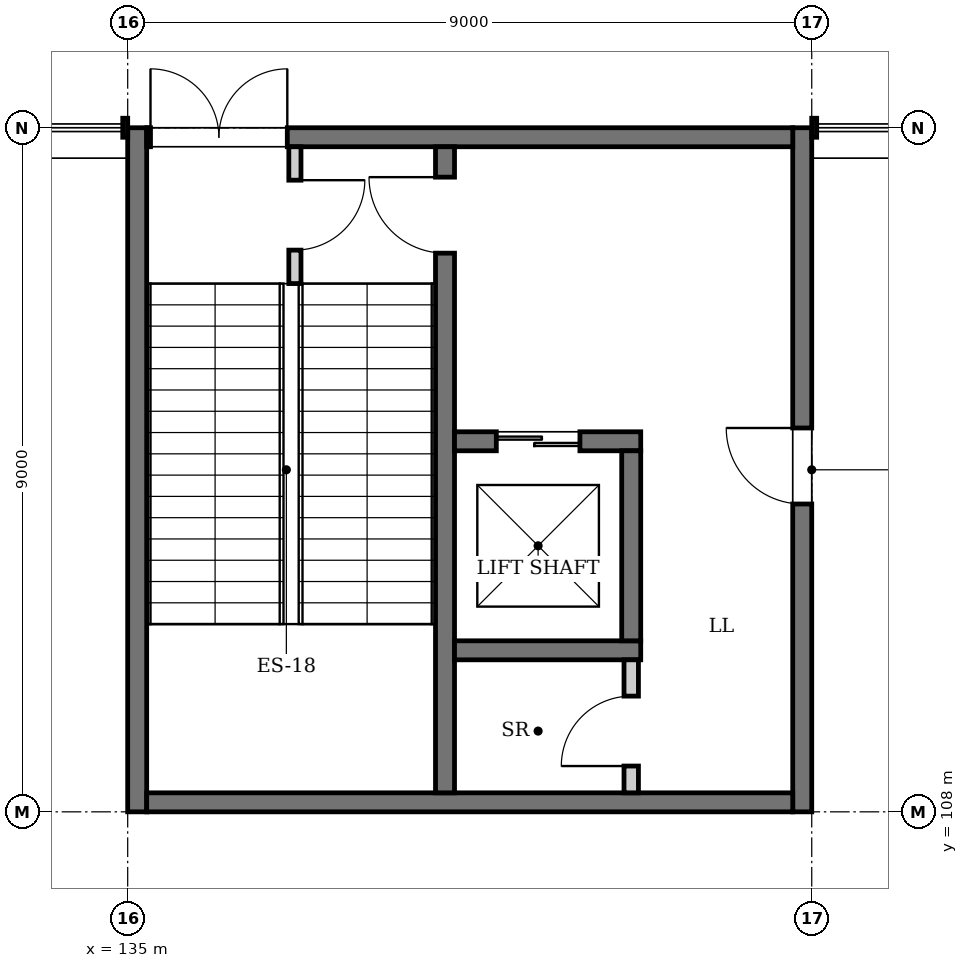
"""IFC4 building model, lengths in metres.
Left out: names, types, materials, properties, quantities, classifications, styles, units other than length and angle.
Written with IfcOpenShell. Run it as: python <this file> out.ifc"""

import sys

from ifc_helpers import new_model, si_unit, direction, frame, frame_2d, origin, place, context, subcontext, project, spatial, rectangle, extrude, element, fill, save


model = new_model("IFC4")
c1 = context("Model", 3, precision=1e-05, world=origin(), true_north=direction((0.0, 1.0)))
c2 = subcontext(c1, "Body", "Model", "MODEL_VIEW")
j1 = project(units=[si_unit("LENGTHUNIT", "METRE"), si_unit("PLANEANGLEUNIT", "RADIAN")], contexts=[c1])
p1 = place(None, origin())
s1 = spatial("IfcSite", under=j1, at=p1, CompositionType="ELEMENT")
p2 = place(p1, origin())
s2 = spatial("IfcBuilding", under=s1, at=p2, CompositionType="ELEMENT")
p3 = place(p2, origin())
s3 = spatial("IfcBuildingStorey", under=s2, at=p3, CompositionType="ELEMENT", Elevation=0.0)
p4 = place(p3, frame((135.125, 108.0, 0.0), z_axis=(0.0, 0.0, 1.0), x_axis=(0.0, 1.0, 0.0)))
e1 = element("IfcWall", 1, at=p4, inside=s3, PredefinedType="SHEAR", context=c2, shape_type="SweptSolid", body=[
    extrude(rectangle(XDim=9.0, YDim=0.25, at=frame_2d((4.5, 0.0))), origin(), (0.0, 0.0, 1.0), 6.0),
])
p5 = place(p3, frame((143.875, 108.0, 0.0), z_axis=(0.0, 0.0, 1.0), x_axis=(0.0, 1.0, 0.0)))
e2 = element("IfcWall", 2, at=p5, inside=s3, PredefinedType="SHEAR", context=c2, shape_type="SweptSolid", body=[
    extrude(rectangle(XDim=9.0, YDim=0.25, at=frame_2d((4.5, 0.0))), origin(), (0.0, 0.0, 1.0), 6.0),
])
p6 = place(p5, frame((4.05, 0.0, 0.0)))
e3 = element("IfcOpeningElement", 3, at=p6, cuts=e2, PredefinedType="OPENING", context=c2, shape_type="SweptSolid", body=[
    extrude(rectangle(XDim=1.0, YDim=2.1, at=frame_2d((0.5, 1.05))), frame((0.0, 0.135, 0.0), z_axis=(0.0, -1.0, 0.0), x_axis=(1.0, 0.0, 0.0)), (0.0, 0.0, 1.0), 0.27),
])
p7 = place(p3, frame((135.25, 108.125, 0.0), z_axis=(0.0, 0.0, 1.0), x_axis=(1.0, 0.0, 0.0)))
e4 = element("IfcWall", 4, at=p7, inside=s3, PredefinedType="SHEAR", context=c2, shape_type="SweptSolid", body=[
    extrude(rectangle(XDim=8.5, YDim=0.25, at=frame_2d((4.25, 0.0))), origin(), (0.0, 0.0, 1.0), 6.0),
])
p8 = place(p3, frame((135.25, 116.875, 0.0), z_axis=(0.0, 0.0, 1.0), x_axis=(1.0, 0.0, 0.0)))
e5 = element("IfcWall", 5, at=p8, inside=s3, PredefinedType="SHEAR", context=c2, shape_type="SweptSolid", body=[
    extrude(rectangle(XDim=8.5, YDim=0.25, at=frame_2d((4.25, 0.0))), origin(), (0.0, 0.0, 1.0), 6.0),
])
p9 = place(p8, frame((0.05, 0.0, 0.0)))
e6 = element("IfcOpeningElement", 6, at=p9, cuts=e5, PredefinedType="OPENING", context=c2, shape_type="SweptSolid", body=[
    extrude(rectangle(XDim=1.8, YDim=2.4, at=frame_2d((0.9, 1.2))), frame((0.0, 0.135, 0.0), z_axis=(0.0, -1.0, 0.0), x_axis=(1.0, 0.0, 0.0)), (0.0, 0.0, 1.0), 0.27),
])
p10 = place(p3, frame((139.175, 116.75, 0.0), z_axis=(0.0, 0.0, 1.0), x_axis=(0.0, -1.0, 0.0)))
e7 = element("IfcWall", 7, at=p10, inside=s3, PredefinedType="SOLIDWALL", context=c2, shape_type="SweptSolid", body=[
    extrude(rectangle(XDim=8.5, YDim=0.25, at=frame_2d((4.25, 0.0))), origin(), (0.0, 0.0, 1.0), 5.75),
])
p11 = place(p10, frame((0.4, 0.0, 0.0)))
e8 = element("IfcOpeningElement", 8, at=p11, cuts=e7, PredefinedType="OPENING", context=c2, shape_type="SweptSolid", body=[
    extrude(rectangle(XDim=1.0, YDim=2.1, at=frame_2d((0.5, 1.05))), frame((0.0, 0.135, 0.0), z_axis=(0.0, -1.0, 0.0), x_axis=(1.0, 0.0, 0.0)), (0.0, 0.0, 1.0), 0.27),
])
p12 = place(p3, frame((139.3, 110.125, 0.0), z_axis=(0.0, 0.0, 1.0), x_axis=(1.0, 0.0, 0.0)))
e9 = element("IfcWall", 9, at=p12, inside=s3, PredefinedType="SOLIDWALL", context=c2, shape_type="SweptSolid", body=[
    extrude(rectangle(XDim=2.45, YDim=0.25, at=frame_2d((1.225, 0.0))), origin(), (0.0, 0.0, 1.0), 6.0),
])
p13 = place(p3, frame((139.3, 112.875, 0.0), z_axis=(0.0, 0.0, 1.0), x_axis=(1.0, 0.0, 0.0)))
e10 = element("IfcWall", 10, at=p13, inside=s3, PredefinedType="SOLIDWALL", context=c2, shape_type="SweptSolid", body=[
    extrude(rectangle(XDim=2.45, YDim=0.25, at=frame_2d((1.225, 0.0))), origin(), (0.0, 0.0, 1.0), 6.0),
])
p14 = place(p13, frame((0.55, 0.0, 0.0)))
e11 = element("IfcOpeningElement", 11, at=p14, cuts=e10, PredefinedType="OPENING", context=c2, shape_type="SweptSolid", body=[
    extrude(rectangle(XDim=1.1, YDim=2.1, at=frame_2d((0.55, 1.05))), frame((0.0, 0.135, 0.0), z_axis=(0.0, -1.0, 0.0), x_axis=(1.0, 0.0, 0.0)), (0.0, 0.0, 1.0), 0.27),
])
p15 = place(p3, frame((141.625, 110.25, 0.0), z_axis=(0.0, 0.0, 1.0), x_axis=(0.0, 1.0, 0.0)))
e12 = element("IfcWall", 12, at=p15, inside=s3, PredefinedType="SOLIDWALL", context=c2, shape_type="SweptSolid", body=[
    extrude(rectangle(XDim=2.5, YDim=0.25, at=frame_2d((1.25, 0.0))), origin(), (0.0, 0.0, 1.0), 6.0),
])
p16 = place(p3, frame((137.2, 116.75, 0.0), z_axis=(0.0, 0.0, 1.0), x_axis=(0.0, -1.0, 0.0)))
e13 = element("IfcWall", 13, at=p16, inside=s3, PredefinedType="PARTITIONING", context=c2, shape_type="SweptSolid", body=[
    extrude(rectangle(XDim=1.8, YDim=0.16, at=frame_2d((0.9, 0.0))), origin(), (0.0, 0.0, 1.0), 5.75),
])
p17 = place(p16, frame((0.44, 0.0, 0.0)))
e14 = element("IfcOpeningElement", 14, at=p17, cuts=e13, PredefinedType="OPENING", context=c2, shape_type="SweptSolid", body=[
    extrude(rectangle(XDim=0.92, YDim=2.1, at=frame_2d((0.46, 1.05))), frame((0.0, 0.09, 0.0), z_axis=(0.0, -1.0, 0.0), x_axis=(1.0, 0.0, 0.0)), (0.0, 0.0, 1.0), 0.18),
])
p18 = place(p3, frame((141.625, 108.25, 0.0), z_axis=(0.0, 0.0, 1.0), x_axis=(0.0, 1.0, 0.0)))
e15 = element("IfcWall", 15, at=p18, inside=s3, PredefinedType="PARTITIONING", context=c2, shape_type="SweptSolid", body=[
    extrude(rectangle(XDim=1.75, YDim=0.19, at=frame_2d((0.875, 0.0))), origin(), (0.0, 0.0, 1.0), 5.75),
])
p19 = place(p18, frame((0.353, 0.0, 0.0)))
e16 = element("IfcOpeningElement", 16, at=p19, cuts=e15, PredefinedType="OPENING", context=c2, shape_type="SweptSolid", body=[
    extrude(rectangle(XDim=0.92, YDim=2.1, at=frame_2d((0.46, 1.05))), frame((0.0, 0.105, 0.0), z_axis=(0.0, -1.0, 0.0), x_axis=(1.0, 0.0, 0.0)), (0.0, 0.0, 1.0), 0.21),
])
p20 = place(p9, origin())
e17 = element("IfcDoor", 17, at=p20, inside=s3, OperationType="DOUBLE_DOOR_SINGLE_SWING", PredefinedType="DOOR", context=c2, shape_type="SweptSolid", body=[
    extrude(rectangle(XDim=1.8, YDim=2.4, at=frame_2d((0.9, 1.2))), frame((0.0, 0.025, 0.0), z_axis=(0.0, -1.0, 0.0), x_axis=(1.0, 0.0, 0.0)), (0.0, 0.0, 1.0), 0.05),
])
fill(e6, e17)
p21 = place(p14, origin())
e18 = element("IfcDoor", 18, at=p21, inside=s3, OperationType="DOUBLE_DOOR_SLIDING", PredefinedType="DOOR", context=c2, shape_type="SweptSolid", body=[
    extrude(rectangle(XDim=1.1, YDim=2.1, at=frame_2d((0.55, 1.05))), frame((0.0, 0.025, 0.0), z_axis=(0.0, -1.0, 0.0), x_axis=(1.0, 0.0, 0.0)), (0.0, 0.0, 1.0), 0.05),
])
fill(e11, e18)
p22 = place(p11, frame((1.0, 0.0, 0.0), z_axis=(0.0, 0.0, 1.0), x_axis=(-1.0, 0.0, 0.0)))
e19 = element("IfcDoor", 19, at=p22, inside=s3, OperationType="SINGLE_SWING_RIGHT", PredefinedType="DOOR", context=c2, shape_type="SweptSolid", body=[
    extrude(rectangle(XDim=1.0, YDim=2.1, at=frame_2d((0.5, 1.05))), frame((0.0, 0.025, 0.0), z_axis=(0.0, -1.0, 0.0), x_axis=(1.0, 0.0, 0.0)), (0.0, 0.0, 1.0), 0.05),
])
fill(e8, e19)
p23 = place(p19, origin())
e20 = element("IfcDoor", 20, at=p23, inside=s3, OperationType="SINGLE_SWING_LEFT", PredefinedType="DOOR", context=c2, shape_type="SweptSolid", body=[
    extrude(rectangle(XDim=0.92, YDim=2.1, at=frame_2d((0.46, 1.05))), frame((0.0, 0.025, 0.0), z_axis=(0.0, -1.0, 0.0), x_axis=(1.0, 0.0, 0.0)), (0.0, 0.0, 1.0), 0.05),
])
fill(e16, e20)
p24 = place(p17, origin())
e21 = element("IfcDoor", 21, at=p24, inside=s3, OperationType="SINGLE_SWING_LEFT", PredefinedType="DOOR", context=c2, shape_type="SweptSolid", body=[
    extrude(rectangle(XDim=0.92, YDim=2.1, at=frame_2d((0.46, 1.05))), frame((0.0, 0.025, 0.0), z_axis=(0.0, -1.0, 0.0), x_axis=(1.0, 0.0, 0.0)), (0.0, 0.0, 1.0), 0.05),
])
fill(e14, e21)
p25 = place(p6, origin())
e22 = element("IfcDoor", 22, at=p25, inside=s3, OperationType="SINGLE_SWING_RIGHT", PredefinedType="DOOR", context=c2, shape_type="SweptSolid", body=[
    extrude(rectangle(XDim=1.0, YDim=2.1, at=frame_2d((0.5, 1.05))), frame((0.0, 0.025, 0.0), z_axis=(0.0, -1.0, 0.0), x_axis=(1.0, 0.0, 0.0)), (0.0, 0.0, 1.0), 0.05),
])
fill(e3, e22)
save(model, sys.argv[1])
